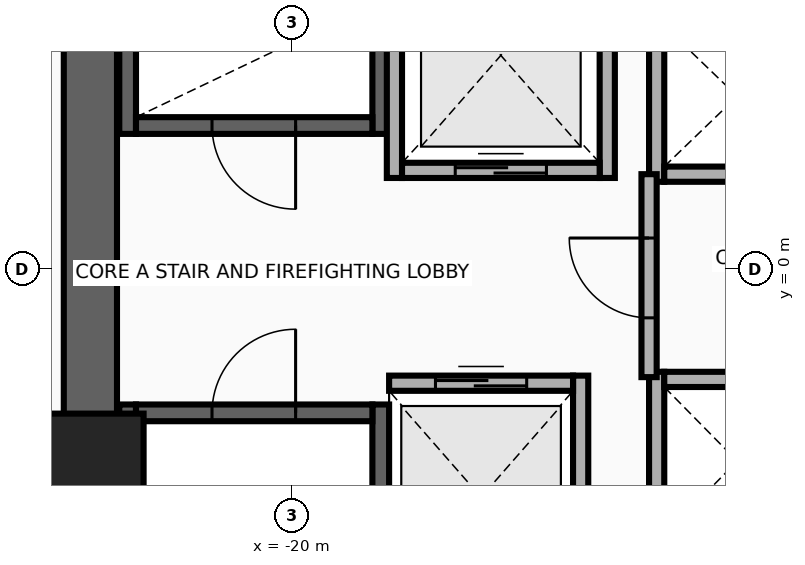
"""IFC4 building model, lengths in metres.
Left out: names, types, materials, properties, quantities, classifications, styles, units other than length and angle.
Written with IfcOpenShell. Run it as: python <this file> out.ifc"""

import sys

from ifc_helpers import new_model, si_unit, direction, frame, frame_2d, origin, origin_2d, place, context, subcontext, project, spatial, rectangle, extrude, source, transform, mapped, element, fill, save


model = new_model("IFC4")
c1 = context("Model", 3, precision=1e-05, world=origin(), true_north=direction((0.0, 1.0)))
c2 = subcontext(c1, "Body", "Model", "MODEL_VIEW")
j1 = project(units=[si_unit("LENGTHUNIT", "METRE"), si_unit("PLANEANGLEUNIT", "RADIAN")], contexts=[c1])
p1 = place(None, origin())
s1 = spatial("IfcSite", under=j1, at=p1, CompositionType="ELEMENT")
p2 = place(p1, origin())
s2 = spatial("IfcBuilding", under=s1, at=p2, CompositionType="ELEMENT")
p3 = place(p2, frame((0.0, 0.0, 40.8)))
s3 = spatial("IfcBuildingStorey", under=s2, at=p3, CompositionType="ELEMENT", Elevation=40.8)
for number, where, z_axis, x_axis in (
    (1, (-22.16, 1.78, 0.0), (0.0, 0.0, 1.0), (0.0, 1.0, 0.0)),
    (2, (-18.83, 1.78, 0.0), (0.0, 0.0, 1.0), (0.0, 1.0, 0.0)),
):
    element("IfcWall", number, at=place(p3, frame(where, z_axis=z_axis, x_axis=x_axis)), inside=s3, PredefinedType="SHEAR", context=c2, shape_type="SweptSolid", body=[
        extrude(rectangle(XDim=8.67, YDim=0.22, at=frame_2d((4.335, 0.0))), origin(), (0.0, 0.0, 1.0), 3.46),
    ])
p4 = place(p3, frame((-22.05, 1.89, 0.0), z_axis=(0.0, 0.0, 1.0), x_axis=(1.0, 0.0, 0.0)))
e3 = element("IfcWall", 3, at=p4, inside=s3, PredefinedType="SHEAR", context=c2, shape_type="SweptSolid", body=[
    extrude(rectangle(XDim=3.11, YDim=0.22, at=frame_2d((1.555, 0.0))), origin(), (0.0, 0.0, 1.0), 3.46),
])
p5 = place(p4, frame((1.0, 0.0, 0.0)))
e4 = element("IfcOpeningElement", 4, at=p5, cuts=e3, PredefinedType="OPENING", context=c2, shape_type="SweptSolid", body=[
    extrude(rectangle(XDim=1.1, YDim=2.15, at=frame_2d((0.55, 1.075))), frame((0.0, 0.125, 0.0), z_axis=(0.0, -1.0, 0.0), x_axis=(1.0, 0.0, 0.0)), (0.0, 0.0, 1.0), 0.25),
])
for number, where, z_axis, x_axis in (
    (5, (-22.16, -10.45, 0.0), (0.0, 0.0, 1.0), (0.0, 1.0, 0.0)),
    (6, (-18.83, -10.45, 0.0), (0.0, 0.0, 1.0), (0.0, 1.0, 0.0)),
):
    element("IfcWall", number, at=place(p3, frame(where, z_axis=z_axis, x_axis=x_axis)), inside=s3, PredefinedType="SHEAR", context=c2, shape_type="SweptSolid", body=[
        extrude(rectangle(XDim=8.67, YDim=0.22, at=frame_2d((4.335, 0.0))), origin(), (0.0, 0.0, 1.0), 3.46),
    ])
p6 = place(p3, frame((-22.05, -1.89, 0.0), z_axis=(0.0, 0.0, 1.0), x_axis=(1.0, 0.0, 0.0)))
e7 = element("IfcWall", 7, at=p6, inside=s3, PredefinedType="SHEAR", context=c2, shape_type="SweptSolid", body=[
    extrude(rectangle(XDim=3.11, YDim=0.22, at=frame_2d((1.555, 0.0))), origin(), (0.0, 0.0, 1.0), 3.46),
])
p7 = place(p6, frame((1.0, 0.0, 0.0)))
e8 = element("IfcOpeningElement", 8, at=p7, cuts=e7, PredefinedType="OPENING", context=c2, shape_type="SweptSolid", body=[
    extrude(rectangle(XDim=1.1, YDim=2.15, at=frame_2d((0.55, 1.075))), frame((0.0, 0.125, 0.0), z_axis=(0.0, -1.0, 0.0), x_axis=(1.0, 0.0, 0.0)), (0.0, 0.0, 1.0), 0.25),
])
p8 = place(p3, frame((-22.65, -11.15, 0.0), z_axis=(0.0, 0.0, 1.0), x_axis=(0.0, 1.0, 0.0)))
e9 = element("IfcWall", 9, at=p8, inside=s3, PredefinedType="SHEAR", context=c2, shape_type="SweptSolid", body=[
    extrude(rectangle(XDim=22.3, YDim=0.7, at=frame_2d((11.15, 0.0))), origin(), (0.0, 0.0, 1.0), 3.46),
])
m1 = source(origin(), c2, "Body", "SweptSolid", [
    extrude(rectangle(XDim=1.4, YDim=1.4, at=origin_2d()), origin(), (0.0, 0.0, 1.0), 3.7),
])
p9 = place(p3, frame((-22.65, -2.6, 0.0), z_axis=(0.0, 0.0, 1.0), x_axis=(1.0, 0.0, 0.0)))
e10 = element("IfcColumn", 10, at=p9, inside=s3, PredefinedType="COLUMN", context=c2, shape_type="MappedRepresentation", body=[
    mapped(m1, transform((0.0, 0.0, 0.0), x_axis=(1.0, 0.0, 0.0), y_axis=(0.0, 1.0, 0.0), z_axis=(0.0, 0.0, 1.0), scale=1.0)),
])
for number, where, z_axis, x_axis in (
    (11, (-18.65, 1.2, 0.0), (0.0, 0.0, 1.0), (0.0, 1.0, 0.0)),
    (12, (-15.85, 1.2, 0.0), (0.0, 0.0, 1.0), (0.0, 1.0, 0.0)),
):
    element("IfcWall", number, at=place(p3, frame(where, z_axis=z_axis, x_axis=x_axis)), inside=s3, PredefinedType="MOVABLE", context=c2, shape_type="SweptSolid", body=[
        extrude(rectangle(XDim=3.225, YDim=0.2, at=frame_2d((1.613, 0.0))), origin(), (0.0, 0.0, 1.0), 3.46),
    ])
p10 = place(p3, frame((-18.55, 1.3, 0.0), z_axis=(0.0, 0.0, 1.0), x_axis=(1.0, 0.0, 0.0)))
e13 = element("IfcWall", 13, at=p10, inside=s3, PredefinedType="MOVABLE", context=c2, shape_type="SweptSolid", body=[
    extrude(rectangle(XDim=2.6, YDim=0.2, at=frame_2d((1.3, 0.0))), origin(), (0.0, 0.0, 1.0), 3.46),
])
p11 = place(p10, frame((0.7, 0.0, 0.0)))
e14 = element("IfcOpeningElement", 14, at=p11, cuts=e13, PredefinedType="OPENING", context=c2, shape_type="SweptSolid", body=[
    extrude(rectangle(XDim=1.2, YDim=2.1, at=frame_2d((0.6, 1.05))), frame((0.0, 0.115, 0.0), z_axis=(0.0, -1.0, 0.0), x_axis=(1.0, 0.0, 0.0)), (0.0, 0.0, 1.0), 0.23),
])
p12 = place(p3, frame((-16.2, -4.6, 0.0), z_axis=(0.0, 0.0, 1.0), x_axis=(0.0, 1.0, 0.0)))
e15 = element("IfcWall", 15, at=p12, inside=s3, PredefinedType="MOVABLE", context=c2, shape_type="SweptSolid", body=[
    extrude(rectangle(XDim=3.2, YDim=0.2, at=frame_2d((1.6, 0.0))), origin(), (0.0, 0.0, 1.0), 3.46),
])
p13 = place(p3, frame((-18.72, -1.5, 0.0), z_axis=(0.0, 0.0, 1.0), x_axis=(1.0, 0.0, 0.0)))
e16 = element("IfcWall", 16, at=p13, inside=s3, PredefinedType="MOVABLE", context=c2, shape_type="SweptSolid", body=[
    extrude(rectangle(XDim=2.42, YDim=0.2, at=frame_2d((1.21, 0.0))), origin(), (0.0, 0.0, 1.0), 3.46),
])
p14 = place(p13, frame((0.61, 0.0, 0.0)))
e17 = element("IfcOpeningElement", 17, at=p14, cuts=e16, PredefinedType="OPENING", context=c2, shape_type="SweptSolid", body=[
    extrude(rectangle(XDim=1.2, YDim=2.1, at=frame_2d((0.6, 1.05))), frame((0.0, 0.115, 0.0), z_axis=(0.0, -1.0, 0.0), x_axis=(1.0, 0.0, 0.0)), (0.0, 0.0, 1.0), 0.23),
])
p15 = place(p3, frame((-15.2, 1.15, 0.0), z_axis=(0.0, 0.0, 1.0), x_axis=(0.0, 1.0, 0.0)))
e18 = element("IfcWall", 18, at=p15, inside=s3, PredefinedType="MOVABLE", context=c2, shape_type="SweptSolid", body=[
    extrude(rectangle(XDim=2.25, YDim=0.2, at=frame_2d((1.125, 0.0))), origin(), (0.0, 0.0, 1.0), 3.46),
])
p16 = place(p3, frame((-15.1, 1.25, 0.0), z_axis=(0.0, 0.0, 1.0), x_axis=(1.0, 0.0, 0.0)))
e19 = element("IfcWall", 19, at=p16, inside=s3, PredefinedType="MOVABLE", context=c2, shape_type="SweptSolid", body=[
    extrude(rectangle(XDim=1.92, YDim=0.2, at=frame_2d((0.96, 0.0))), origin(), (0.0, 0.0, 1.0), 3.46),
])
p17 = place(p3, frame((-15.2, -3.7, 0.0), z_axis=(0.0, 0.0, 1.0), x_axis=(0.0, 1.0, 0.0)))
e20 = element("IfcWall", 20, at=p17, inside=s3, PredefinedType="MOVABLE", context=c2, shape_type="SweptSolid", body=[
    extrude(rectangle(XDim=2.35, YDim=0.2, at=frame_2d((1.175, 0.0))), origin(), (0.0, 0.0, 1.0), 3.46),
])
p18 = place(p3, frame((-15.1, -1.45, 0.0), z_axis=(0.0, 0.0, 1.0), x_axis=(1.0, 0.0, 0.0)))
e21 = element("IfcWall", 21, at=p18, inside=s3, PredefinedType="MOVABLE", context=c2, shape_type="SweptSolid", body=[
    extrude(rectangle(XDim=1.92, YDim=0.2, at=frame_2d((0.96, 0.0))), origin(), (0.0, 0.0, 1.0), 3.46),
])
p19 = place(p3, frame((-15.3, -1.42, 0.0), z_axis=(0.0, 0.0, 1.0), x_axis=(0.0, 1.0, 0.0)))
e22 = element("IfcWall", 22, at=p19, inside=s3, PredefinedType="PARTITIONING", context=c2, shape_type="SweptSolid", body=[
    extrude(rectangle(XDim=2.67, YDim=0.2, at=frame_2d((1.335, 0.0))), origin(), (0.0, 0.0, 1.0), 3.46),
])
p20 = place(p19, frame((0.78, 0.0, 0.0)))
e23 = element("IfcOpeningElement", 23, at=p20, cuts=e22, PredefinedType="OPENING", context=c2, shape_type="SweptSolid", body=[
    extrude(rectangle(XDim=1.05, YDim=2.15, at=frame_2d((0.525, 1.075))), frame((0.0, 0.115, 0.0), z_axis=(0.0, -1.0, 0.0), x_axis=(1.0, 0.0, 0.0)), (0.0, 0.0, 1.0), 0.23),
])
p21 = place(p11, origin())
e24 = element("IfcDoor", 24, at=p21, inside=s3, OperationType="DOUBLE_DOOR_SLIDING", PredefinedType="DOOR", context=c2, shape_type="SweptSolid", body=[
    extrude(rectangle(XDim=1.2, YDim=2.1, at=frame_2d((0.6, 1.05))), frame((0.0, 0.025, 0.0), z_axis=(0.0, -1.0, 0.0), x_axis=(1.0, 0.0, 0.0)), (0.0, 0.0, 1.0), 0.05),
])
fill(e14, e24)
p22 = place(p14, origin())
e25 = element("IfcDoor", 25, at=p22, inside=s3, OperationType="DOUBLE_DOOR_SLIDING", PredefinedType="DOOR", context=c2, shape_type="SweptSolid", body=[
    extrude(rectangle(XDim=1.2, YDim=2.1, at=frame_2d((0.6, 1.05))), frame((0.0, 0.025, 0.0), z_axis=(0.0, -1.0, 0.0), x_axis=(1.0, 0.0, 0.0)), (0.0, 0.0, 1.0), 0.05),
])
fill(e17, e25)
p23 = place(p20, origin())
e26 = element("IfcDoor", 26, at=p23, inside=s3, OperationType="SINGLE_SWING_RIGHT", PredefinedType="DOOR", context=c2, shape_type="SweptSolid", body=[
    extrude(rectangle(XDim=1.05, YDim=2.15, at=frame_2d((0.525, 1.075))), frame((0.0, 0.025, 0.0), z_axis=(0.0, -1.0, 0.0), x_axis=(1.0, 0.0, 0.0)), (0.0, 0.0, 1.0), 0.05),
])
fill(e23, e26)
p24 = place(p5, frame((1.1, 0.0, 0.0), z_axis=(0.0, 0.0, 1.0), x_axis=(-1.0, 0.0, 0.0)))
e27 = element("IfcDoor", 27, at=p24, inside=s3, OperationType="SINGLE_SWING_LEFT", PredefinedType="DOOR", context=c2, shape_type="SweptSolid", body=[
    extrude(rectangle(XDim=1.1, YDim=2.15, at=frame_2d((0.55, 1.075))), frame((0.0, 0.025, 0.0), z_axis=(0.0, -1.0, 0.0), x_axis=(1.0, 0.0, 0.0)), (0.0, 0.0, 1.0), 0.05),
])
fill(e4, e27)
p25 = place(p7, origin())
e28 = element("IfcDoor", 28, at=p25, inside=s3, OperationType="SINGLE_SWING_RIGHT", PredefinedType="DOOR", context=c2, shape_type="SweptSolid", body=[
    extrude(rectangle(XDim=1.1, YDim=2.15, at=frame_2d((0.55, 1.075))), frame((0.0, 0.025, 0.0), z_axis=(0.0, -1.0, 0.0), x_axis=(1.0, 0.0, 0.0)), (0.0, 0.0, 1.0), 0.05),
])
fill(e8, e28)
save(model, sys.argv[1])
